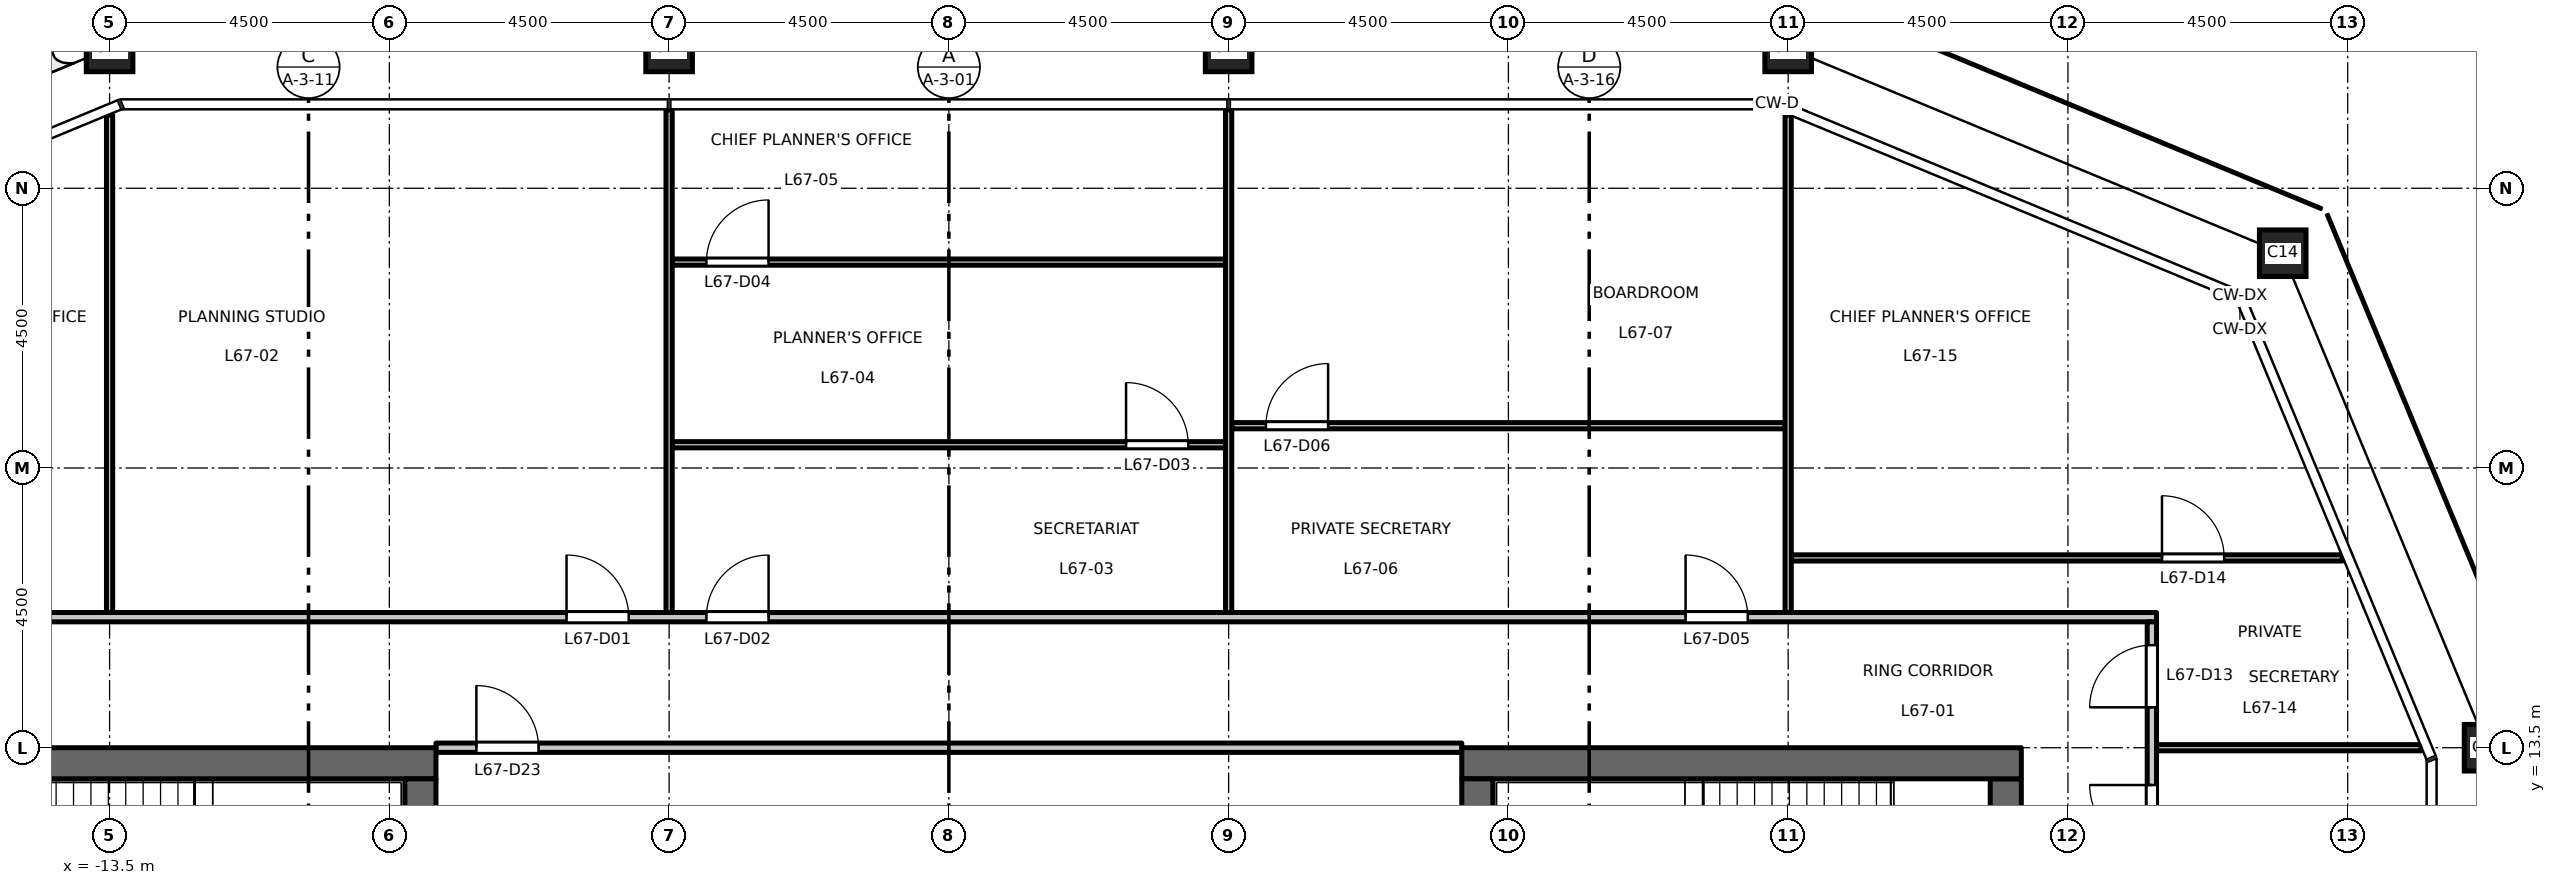
"""IFC4 building model, lengths in metres.
Left out: names, types, materials, properties, quantities, classifications, styles, units other than length and angle.
Written with IfcOpenShell. Run it as: python <this file> out.ifc"""

import sys

from ifc_helpers import new_model, si_unit, direction, frame, frame_2d, origin, origin_2d, place, context, subcontext, project, spatial, rectangle, hollow_rectangle, extrude, element, fill, save


model = new_model("IFC4")
c1 = context("Model", 3, precision=1e-05, world=origin(), true_north=direction((0.0, 1.0)))
c2 = subcontext(c1, "Body", "Model", "MODEL_VIEW")
j1 = project(units=[si_unit("LENGTHUNIT", "METRE"), si_unit("PLANEANGLEUNIT", "RADIAN")], contexts=[c1])
p1 = place(None, origin())
s1 = spatial("IfcSite", under=j1, at=p1, CompositionType="ELEMENT")
p2 = place(p1, origin())
s2 = spatial("IfcBuilding", under=s1, at=p2, CompositionType="ELEMENT")
p3 = place(p2, frame((0.0, 0.0, 312.2)))
s3 = spatial("IfcBuildingStorey", under=s2, at=p3, CompositionType="ELEMENT", Elevation=312.2)
for number, where, z_axis, x_axis in (
    (1, (24.75, 13.5, 0.0), (0.0, 0.0, 1.0), (1.0, 0.0, 0.0)),
    (2, (21.455, 21.455, 0.0), (0.0, 0.0, 1.0), (1.0, 0.0, 0.0)),
    (3, (13.5, 24.75, 0.0), (0.0, 0.0, 1.0), (1.0, 0.0, 0.0)),
    (4, (4.5, 24.75, 0.0), (0.0, 0.0, 1.0), (1.0, 0.0, 0.0)),
    (5, (-4.5, 24.75, 0.0), (0.0, 0.0, 1.0), (1.0, 0.0, 0.0)),
    (6, (-13.5, 24.75, 0.0), (0.0, 0.0, 1.0), (1.0, 0.0, 0.0)),
):
    element("IfcColumn", number, at=place(p3, frame(where, z_axis=z_axis, x_axis=x_axis)), inside=s3, PredefinedType="COLUMN", context=c2, shape_type="SweptSolid", body=[
        extrude(hollow_rectangle(XDim=0.75, YDim=0.75, WallThickness=0.04, at=origin_2d()), origin(), (0.0, 0.0, 1.0), 4.5),
    ])
p4 = place(p3, frame((-8.25, 13.25, 0.0), z_axis=(0.0, 0.0, 1.0), x_axis=(-1.0, 0.0, 0.0)))
e7 = element("IfcWall", 7, at=p4, inside=s3, PredefinedType="SHEAR", context=c2, shape_type="SweptSolid", body=[
    extrude(rectangle(XDim=9.0, YDim=0.5, at=frame_2d((4.5, 0.0))), origin(), (0.0, 0.0, 1.0), 4.35),
])
p5 = place(p3, frame((-8.5, -13.0, 0.0), z_axis=(0.0, 0.0, 1.0), x_axis=(0.0, 1.0, 0.0)))
e8 = element("IfcWall", 8, at=p5, inside=s3, PredefinedType="SHEAR", context=c2, shape_type="SweptSolid", body=[
    extrude(rectangle(XDim=26.0, YDim=0.5, at=frame_2d((13.0, 0.0))), origin(), (0.0, 0.0, 1.0), 4.35),
])
p6 = place(p3, frame((17.0, -13.0, 0.0), z_axis=(0.0, 0.0, 1.0), x_axis=(0.0, 1.0, 0.0)))
e9 = element("IfcWall", 9, at=p6, inside=s3, PredefinedType="SHEAR", context=c2, shape_type="SweptSolid", body=[
    extrude(rectangle(XDim=26.0, YDim=0.5, at=frame_2d((13.0, 0.0))), origin(), (0.0, 0.0, 1.0), 4.35),
])
p7 = place(p6, frame((16.825, 0.0, 0.0)))
e10 = element("IfcOpeningElement", 10, at=p7, cuts=e9, PredefinedType="OPENING", context=c2, shape_type="SweptSolid", body=[
    extrude(rectangle(XDim=1.8, YDim=2.1, at=frame_2d((0.9, 1.05))), frame((0.0, 0.26, 0.0), z_axis=(0.0, -1.0, 0.0), x_axis=(1.0, 0.0, 0.0)), (0.0, 0.0, 1.0), 0.52),
])
p8 = place(p6, frame((7.375, 0.0, 0.0)))
e11 = element("IfcOpeningElement", 11, at=p8, cuts=e9, PredefinedType="OPENING", context=c2, shape_type="SweptSolid", body=[
    extrude(rectangle(XDim=1.8, YDim=2.1, at=frame_2d((0.9, 1.05))), frame((0.0, 0.26, 0.0), z_axis=(0.0, -1.0, 0.0), x_axis=(1.0, 0.0, 0.0)), (0.0, 0.0, 1.0), 0.52),
])
p9 = place(p3, frame((8.25, 13.25, 0.0), z_axis=(0.0, 0.0, 1.0), x_axis=(1.0, 0.0, 0.0)))
e12 = element("IfcWall", 12, at=p9, inside=s3, PredefinedType="SHEAR", context=c2, shape_type="SweptSolid", body=[
    extrude(rectangle(XDim=9.0, YDim=0.5, at=frame_2d((4.5, 0.0))), origin(), (0.0, 0.0, 1.0), 4.35),
])
p10 = place(p3, frame((8.5, -13.0, 0.0), z_axis=(0.0, 0.0, 1.0), x_axis=(0.0, 1.0, 0.0)))
e13 = element("IfcWall", 13, at=p10, inside=s3, PredefinedType="SHEAR", context=c2, shape_type="SweptSolid", body=[
    extrude(rectangle(XDim=26.0, YDim=0.5, at=frame_2d((13.0, 0.0))), origin(), (0.0, 0.0, 1.0), 4.35),
])
p11 = place(p3, frame((19.425, 13.5, 0.0), z_axis=(0.0, 0.0, 1.0), x_axis=(1.0, 0.0, 0.0)))
e14 = element("IfcWall", 14, at=p11, inside=s3, PredefinedType="PARTITIONING", context=c2, shape_type="SweptSolid", body=[
    extrude(rectangle(XDim=4.253, YDim=0.1, at=frame_2d((2.126, 0.0))), origin(), (0.0, 0.0, 1.0), 4.35),
])
p12 = place(p3, frame((-8.25, 13.5, 0.0), z_axis=(0.0, 0.0, 1.0), x_axis=(1.0, 0.0, 0.0)))
e15 = element("IfcWall", 15, at=p12, inside=s3, PredefinedType="PARTITIONING", context=c2, shape_type="SweptSolid", body=[
    extrude(rectangle(XDim=16.5, YDim=0.15, at=frame_2d((8.25, 0.0))), origin(), (0.0, 0.0, 1.0), 4.35),
])
p13 = place(p12, frame((0.65, 0.0, 0.0)))
e16 = element("IfcOpeningElement", 16, at=p13, cuts=e15, PredefinedType="OPENING", context=c2, shape_type="SweptSolid", body=[
    extrude(rectangle(XDim=1.0, YDim=2.1, at=frame_2d((0.5, 1.05))), frame((0.0, 0.085, 0.0), z_axis=(0.0, -1.0, 0.0), x_axis=(1.0, 0.0, 0.0)), (0.0, 0.0, 1.0), 0.17),
])
p14 = place(p3, frame((-19.425, 15.6, 0.0), z_axis=(0.0, 0.0, 1.0), x_axis=(1.0, 0.0, 0.0)))
e17 = element("IfcWall", 17, at=p14, inside=s3, PredefinedType="PARTITIONING", context=c2, shape_type="SweptSolid", body=[
    extrude(rectangle(XDim=38.85, YDim=0.15, at=frame_2d((19.425, 0.0))), origin(), (0.0, 0.0, 1.0), 4.35),
])
p15 = place(p14, frame((13.275, 0.0, 0.0)))
e18 = element("IfcOpeningElement", 18, at=p15, cuts=e17, PredefinedType="OPENING", context=c2, shape_type="SweptSolid", body=[
    extrude(rectangle(XDim=1.0, YDim=2.1, at=frame_2d((0.5, 1.05))), frame((0.0, 0.085, 0.0), z_axis=(0.0, -1.0, 0.0), x_axis=(1.0, 0.0, 0.0)), (0.0, 0.0, 1.0), 0.17),
])
p16 = place(p14, frame((15.525, 0.0, 0.0)))
e19 = element("IfcOpeningElement", 19, at=p16, cuts=e17, PredefinedType="OPENING", context=c2, shape_type="SweptSolid", body=[
    extrude(rectangle(XDim=1.0, YDim=2.1, at=frame_2d((0.5, 1.05))), frame((0.0, 0.085, 0.0), z_axis=(0.0, -1.0, 0.0), x_axis=(1.0, 0.0, 0.0)), (0.0, 0.0, 1.0), 0.17),
])
p17 = place(p14, frame((31.275, 0.0, 0.0)))
e20 = element("IfcOpeningElement", 20, at=p17, cuts=e17, PredefinedType="OPENING", context=c2, shape_type="SweptSolid", body=[
    extrude(rectangle(XDim=1.0, YDim=2.1, at=frame_2d((0.5, 1.05))), frame((0.0, 0.085, 0.0), z_axis=(0.0, -1.0, 0.0), x_axis=(1.0, 0.0, 0.0)), (0.0, 0.0, 1.0), 0.17),
])
p18 = place(p14, frame((0.775, 0.0, 0.0)))
e21 = element("IfcOpeningElement", 21, at=p18, cuts=e17, PredefinedType="OPENING", context=c2, shape_type="SweptSolid", body=[
    extrude(rectangle(XDim=1.0, YDim=2.1, at=frame_2d((0.5, 1.05))), frame((0.0, 0.085, 0.0), z_axis=(0.0, -1.0, 0.0), x_axis=(1.0, 0.0, 0.0)), (0.0, 0.0, 1.0), 0.17),
])
p19 = place(p3, frame((13.55, 16.553, 0.0), z_axis=(0.0, 0.0, 1.0), x_axis=(1.0, 0.0, 0.0)))
e22 = element("IfcWall", 22, at=p19, inside=s3, PredefinedType="PARTITIONING", context=c2, shape_type="SweptSolid", body=[
    extrude(rectangle(XDim=8.863, YDim=0.1, at=frame_2d((4.432, 0.0))), origin(), (0.0, 0.0, 1.0), 4.35),
])
p20 = place(p19, frame((5.963, 0.0, 0.0)))
e23 = element("IfcOpeningElement", 23, at=p20, cuts=e22, PredefinedType="OPENING", context=c2, shape_type="SweptSolid", body=[
    extrude(rectangle(XDim=1.0, YDim=2.1, at=frame_2d((0.5, 1.05))), frame((0.0, 0.06, 0.0), z_axis=(0.0, -1.0, 0.0), x_axis=(1.0, 0.0, 0.0)), (0.0, 0.0, 1.0), 0.12),
])
p21 = place(p3, frame((-4.45, 18.374, 0.0), z_axis=(0.0, 0.0, 1.0), x_axis=(1.0, 0.0, 0.0)))
e24 = element("IfcWall", 24, at=p21, inside=s3, PredefinedType="PARTITIONING", context=c2, shape_type="SweptSolid", body=[
    extrude(rectangle(XDim=8.9, YDim=0.1, at=frame_2d((4.45, 0.0))), origin(), (0.0, 0.0, 1.0), 4.35),
])
p22 = place(p21, frame((7.3, 0.0, 0.0)))
e25 = element("IfcOpeningElement", 25, at=p22, cuts=e24, PredefinedType="OPENING", context=c2, shape_type="SweptSolid", body=[
    extrude(rectangle(XDim=1.0, YDim=2.1, at=frame_2d((0.5, 1.05))), frame((0.0, 0.06, 0.0), z_axis=(0.0, -1.0, 0.0), x_axis=(1.0, 0.0, 0.0)), (0.0, 0.0, 1.0), 0.12),
])
p23 = place(p3, frame((4.55, 18.68, 0.0), z_axis=(0.0, 0.0, 1.0), x_axis=(1.0, 0.0, 0.0)))
e26 = element("IfcWall", 26, at=p23, inside=s3, PredefinedType="PARTITIONING", context=c2, shape_type="SweptSolid", body=[
    extrude(rectangle(XDim=8.9, YDim=0.1, at=frame_2d((4.45, 0.0))), origin(), (0.0, 0.0, 1.0), 4.35),
])
p24 = place(p23, frame((0.55, 0.0, 0.0)))
e27 = element("IfcOpeningElement", 27, at=p24, cuts=e26, PredefinedType="OPENING", context=c2, shape_type="SweptSolid", body=[
    extrude(rectangle(XDim=1.0, YDim=2.1, at=frame_2d((0.5, 1.05))), frame((0.0, 0.06, 0.0), z_axis=(0.0, -1.0, 0.0), x_axis=(1.0, 0.0, 0.0)), (0.0, 0.0, 1.0), 0.12),
])
p25 = place(p3, frame((-4.45, 21.312, 0.0), z_axis=(0.0, 0.0, 1.0), x_axis=(1.0, 0.0, 0.0)))
e28 = element("IfcWall", 28, at=p25, inside=s3, PredefinedType="PARTITIONING", context=c2, shape_type="SweptSolid", body=[
    extrude(rectangle(XDim=8.9, YDim=0.1, at=frame_2d((4.45, 0.0))), origin(), (0.0, 0.0, 1.0), 4.35),
])
p26 = place(p25, frame((0.55, 0.0, 0.0)))
e29 = element("IfcOpeningElement", 29, at=p26, cuts=e28, PredefinedType="OPENING", context=c2, shape_type="SweptSolid", body=[
    extrude(rectangle(XDim=1.0, YDim=2.1, at=frame_2d((0.5, 1.05))), frame((0.0, 0.06, 0.0), z_axis=(0.0, -1.0, 0.0), x_axis=(1.0, 0.0, 0.0)), (0.0, 0.0, 1.0), 0.12),
])
p27 = place(p3, frame((-13.5, 15.675, 0.0), z_axis=(0.0, 0.0, 1.0), x_axis=(0.0, 1.0, 0.0)))
e30 = element("IfcWall", 30, at=p27, inside=s3, PredefinedType="PARTITIONING", context=c2, shape_type="SweptSolid", body=[
    extrude(rectangle(XDim=8.003, YDim=0.1, at=frame_2d((4.001, 0.0))), origin(), (0.0, 0.0, 1.0), 3.75),
])
for number, where, z_axis, x_axis in (
    (31, (-4.5, 15.675, 0.0), (0.0, 0.0, 1.0), (0.0, 1.0, 0.0)),
    (32, (4.5, 15.675, 0.0), (0.0, 0.0, 1.0), (0.0, 1.0, 0.0)),
):
    element("IfcWall", number, at=place(p3, frame(where, z_axis=z_axis, x_axis=x_axis)), inside=s3, PredefinedType="PARTITIONING", context=c2, shape_type="SweptSolid", body=[
        extrude(rectangle(XDim=8.085, YDim=0.1, at=frame_2d((4.042, 0.0))), origin(), (0.0, 0.0, 1.0), 3.65),
    ])
p28 = place(p3, frame((13.5, 15.675, 0.0), z_axis=(0.0, 0.0, 1.0), x_axis=(0.0, 1.0, 0.0)))
e33 = element("IfcWall", 33, at=p28, inside=s3, PredefinedType="PARTITIONING", context=c2, shape_type="SweptSolid", body=[
    extrude(rectangle(XDim=8.003, YDim=0.1, at=frame_2d((4.001, 0.0))), origin(), (0.0, 0.0, 1.0), 3.75),
])
p29 = place(p3, frame((19.35, -15.525, 0.0), z_axis=(0.0, 0.0, 1.0), x_axis=(0.0, 1.0, 0.0)))
e34 = element("IfcWall", 34, at=p29, inside=s3, PredefinedType="PARTITIONING", context=c2, shape_type="SweptSolid", body=[
    extrude(rectangle(XDim=31.05, YDim=0.15, at=frame_2d((15.525, 0.0))), origin(), (0.0, 0.0, 1.0), 4.35),
])
p30 = place(p29, frame((29.675, 0.0, 0.0)))
e35 = element("IfcOpeningElement", 35, at=p30, cuts=e34, PredefinedType="OPENING", context=c2, shape_type="SweptSolid", body=[
    extrude(rectangle(XDim=1.0, YDim=2.1, at=frame_2d((0.5, 1.05))), frame((0.0, 0.085, 0.0), z_axis=(0.0, -1.0, 0.0), x_axis=(1.0, 0.0, 0.0)), (0.0, 0.0, 1.0), 0.17),
])
p31 = place(p29, frame((9.425, 0.0, 0.0)))
e36 = element("IfcOpeningElement", 36, at=p31, cuts=e34, PredefinedType="OPENING", context=c2, shape_type="SweptSolid", body=[
    extrude(rectangle(XDim=1.0, YDim=2.1, at=frame_2d((0.5, 1.05))), frame((0.0, 0.085, 0.0), z_axis=(0.0, -1.0, 0.0), x_axis=(1.0, 0.0, 0.0)), (0.0, 0.0, 1.0), 0.17),
])
p32 = place(p29, frame((11.675, 0.0, 0.0)))
e37 = element("IfcOpeningElement", 37, at=p32, cuts=e34, PredefinedType="OPENING", context=c2, shape_type="SweptSolid", body=[
    extrude(rectangle(XDim=1.0, YDim=2.1, at=frame_2d((0.5, 1.05))), frame((0.0, 0.085, 0.0), z_axis=(0.0, -1.0, 0.0), x_axis=(1.0, 0.0, 0.0)), (0.0, 0.0, 1.0), 0.17),
])
p33 = place(p29, frame((27.425, 0.0, 0.0)))
e38 = element("IfcOpeningElement", 38, at=p33, cuts=e34, PredefinedType="OPENING", context=c2, shape_type="SweptSolid", body=[
    extrude(rectangle(XDim=1.0, YDim=2.1, at=frame_2d((0.5, 1.05))), frame((0.0, 0.085, 0.0), z_axis=(0.0, -1.0, 0.0), x_axis=(1.0, 0.0, 0.0)), (0.0, 0.0, 1.0), 0.17),
])
p34 = place(p15, origin())
e39 = element("IfcDoor", 39, at=p34, inside=s3, OperationType="SINGLE_SWING_LEFT", PredefinedType="DOOR", context=c2, shape_type="SweptSolid", body=[
    extrude(rectangle(XDim=1.0, YDim=2.1, at=frame_2d((0.5, 1.05))), frame((0.0, 0.025, 0.0), z_axis=(0.0, -1.0, 0.0), x_axis=(1.0, 0.0, 0.0)), (0.0, 0.0, 1.0), 0.05),
])
fill(e18, e39)
p35 = place(p16, origin())
e40 = element("IfcDoor", 40, at=p35, inside=s3, OperationType="SINGLE_SWING_RIGHT", PredefinedType="DOOR", context=c2, shape_type="SweptSolid", body=[
    extrude(rectangle(XDim=1.0, YDim=2.1, at=frame_2d((0.5, 1.05))), frame((0.0, 0.025, 0.0), z_axis=(0.0, -1.0, 0.0), x_axis=(1.0, 0.0, 0.0)), (0.0, 0.0, 1.0), 0.05),
])
fill(e19, e40)
p36 = place(p22, origin())
e41 = element("IfcDoor", 41, at=p36, inside=s3, OperationType="SINGLE_SWING_LEFT", PredefinedType="DOOR", context=c2, shape_type="SweptSolid", body=[
    extrude(rectangle(XDim=1.0, YDim=2.1, at=frame_2d((0.5, 1.05))), frame((0.0, 0.025, 0.0), z_axis=(0.0, -1.0, 0.0), x_axis=(1.0, 0.0, 0.0)), (0.0, 0.0, 1.0), 0.05),
])
fill(e25, e41)
p37 = place(p26, origin())
e42 = element("IfcDoor", 42, at=p37, inside=s3, OperationType="SINGLE_SWING_RIGHT", PredefinedType="DOOR", context=c2, shape_type="SweptSolid", body=[
    extrude(rectangle(XDim=1.0, YDim=2.1, at=frame_2d((0.5, 1.05))), frame((0.0, 0.025, 0.0), z_axis=(0.0, -1.0, 0.0), x_axis=(1.0, 0.0, 0.0)), (0.0, 0.0, 1.0), 0.05),
])
fill(e29, e42)
p38 = place(p17, origin())
e43 = element("IfcDoor", 43, at=p38, inside=s3, OperationType="SINGLE_SWING_LEFT", PredefinedType="DOOR", context=c2, shape_type="SweptSolid", body=[
    extrude(rectangle(XDim=1.0, YDim=2.1, at=frame_2d((0.5, 1.05))), frame((0.0, 0.025, 0.0), z_axis=(0.0, -1.0, 0.0), x_axis=(1.0, 0.0, 0.0)), (0.0, 0.0, 1.0), 0.05),
])
fill(e20, e43)
p39 = place(p24, origin())
e44 = element("IfcDoor", 44, at=p39, inside=s3, OperationType="SINGLE_SWING_RIGHT", PredefinedType="DOOR", context=c2, shape_type="SweptSolid", body=[
    extrude(rectangle(XDim=1.0, YDim=2.1, at=frame_2d((0.5, 1.05))), frame((0.0, 0.025, 0.0), z_axis=(0.0, -1.0, 0.0), x_axis=(1.0, 0.0, 0.0)), (0.0, 0.0, 1.0), 0.05),
])
fill(e27, e44)
p40 = place(p30, origin())
e45 = element("IfcDoor", 45, at=p40, inside=s3, OperationType="SINGLE_SWING_LEFT", PredefinedType="DOOR", context=c2, shape_type="SweptSolid", body=[
    extrude(rectangle(XDim=1.0, YDim=2.1, at=frame_2d((0.5, 1.05))), frame((0.0, 0.025, 0.0), z_axis=(0.0, -1.0, 0.0), x_axis=(1.0, 0.0, 0.0)), (0.0, 0.0, 1.0), 0.05),
])
fill(e35, e45)
p41 = place(p20, origin())
e46 = element("IfcDoor", 46, at=p41, inside=s3, OperationType="SINGLE_SWING_LEFT", PredefinedType="DOOR", context=c2, shape_type="SweptSolid", body=[
    extrude(rectangle(XDim=1.0, YDim=2.1, at=frame_2d((0.5, 1.05))), frame((0.0, 0.025, 0.0), z_axis=(0.0, -1.0, 0.0), x_axis=(1.0, 0.0, 0.0)), (0.0, 0.0, 1.0), 0.05),
])
fill(e23, e46)
p42 = place(p33, origin())
e47 = element("IfcDoor", 47, at=p42, inside=s3, OperationType="SINGLE_SWING_RIGHT", PredefinedType="DOOR", context=c2, shape_type="SweptSolid", body=[
    extrude(rectangle(XDim=1.0, YDim=2.1, at=frame_2d((0.5, 1.05))), frame((0.0, 0.025, 0.0), z_axis=(0.0, -1.0, 0.0), x_axis=(1.0, 0.0, 0.0)), (0.0, 0.0, 1.0), 0.05),
])
fill(e38, e47)
p43 = place(p13, origin())
e48 = element("IfcDoor", 48, at=p43, inside=s3, OperationType="SINGLE_SWING_LEFT", PredefinedType="DOOR", context=c2, shape_type="SweptSolid", body=[
    extrude(rectangle(XDim=1.0, YDim=2.1, at=frame_2d((0.5, 1.05))), frame((0.0, 0.025, 0.0), z_axis=(0.0, -1.0, 0.0), x_axis=(1.0, 0.0, 0.0)), (0.0, 0.0, 1.0), 0.05),
])
fill(e16, e48)
save(model, sys.argv[1])
